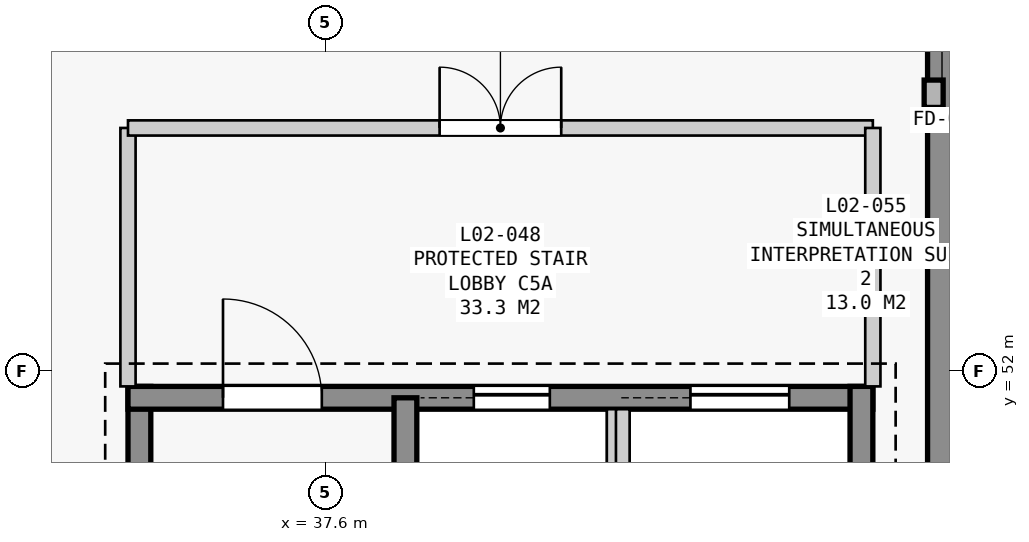
"""IFC4 building model, lengths in metres.
Left out: names, types, materials, properties, quantities, classifications, styles, units other than length and angle.
Written with IfcOpenShell. Run it as: python <this file> out.ifc"""

import sys

from ifc_helpers import new_model, si_unit, direction, frame, frame_2d, origin, place, context, subcontext, project, spatial, rectangle, extrude, element, fill, save


model = new_model("IFC4")
c1 = context("Model", 3, precision=1e-05, world=origin(), true_north=direction((0.0, 1.0)))
c2 = subcontext(c1, "Body", "Model", "MODEL_VIEW")
j1 = project(units=[si_unit("LENGTHUNIT", "METRE"), si_unit("PLANEANGLEUNIT", "RADIAN")], contexts=[c1])
p1 = place(None, origin())
s1 = spatial("IfcSite", under=j1, at=p1, CompositionType="ELEMENT")
p2 = place(p1, origin())
s2 = spatial("IfcBuilding", under=s1, at=p2, CompositionType="ELEMENT")
p3 = place(p2, frame((0.0, 0.0, 9.6)))
s3 = spatial("IfcBuildingStorey", under=s2, at=p3, CompositionType="ELEMENT", Elevation=9.6)
p4 = place(p3, frame((45.71, 75.71, 0.0), z_axis=(0.0, 0.0, 1.0), x_axis=(0.0, -1.0, 0.0)))
e1 = element("IfcWall", 1, at=p4, inside=s3, PredefinedType="STANDARD", context=c2, shape_type="SweptSolid", body=[
    extrude(rectangle(XDim=33.02, YDim=0.38, at=frame_2d((16.51, 0.0))), origin(), (0.0, 0.0, 1.0), 3.94),
])
p5 = place(p4, frame((17.61, 0.0, 0.0)))
e2 = element("IfcOpeningElement", 2, at=p5, cuts=e1, PredefinedType="OPENING", context=c2, shape_type="SweptSolid", body=[
    extrude(rectangle(XDim=1.8, YDim=2.2, at=frame_2d((0.9, 1.1))), frame((0.0, 0.2, 0.0), z_axis=(0.0, -1.0, 0.0), x_axis=(1.0, 0.0, 0.0)), (0.0, 0.0, 1.0), 0.4),
])
p6 = place(p3, frame((35.15, 43.7, 0.0), z_axis=(0.0, 0.0, 1.0), x_axis=(0.0, 1.0, 0.0)))
e3 = element("IfcWall", 3, at=p6, inside=s3, PredefinedType="SHEAR", context=c2, shape_type="SweptSolid", body=[
    extrude(rectangle(XDim=8.1, YDim=0.3, at=frame_2d((4.05, 0.0))), origin(), (0.0, 0.0, 1.0), 4.2),
])
p7 = place(p3, frame((35.0, 51.65, 0.0), z_axis=(0.0, 0.0, 1.0), x_axis=(1.0, 0.0, 0.0)))
e4 = element("IfcWall", 4, at=p7, inside=s3, PredefinedType="SHEAR", context=c2, shape_type="SweptSolid", body=[
    extrude(rectangle(XDim=9.8, YDim=0.3, at=frame_2d((4.9, 0.0))), origin(), (0.0, 0.0, 1.0), 4.2),
])
p8 = place(p7, frame((1.25, 0.0, 0.0)))
e5 = element("IfcOpeningElement", 5, at=p8, cuts=e4, PredefinedType="OPENING", context=c2, shape_type="SweptSolid", body=[
    extrude(rectangle(XDim=1.3, YDim=2.2, at=frame_2d((0.65, 1.1))), frame((0.0, 0.16, 0.0), z_axis=(0.0, -1.0, 0.0), x_axis=(1.0, 0.0, 0.0)), (0.0, 0.0, 1.0), 0.32),
])
p9 = place(p7, frame((4.55, 0.0, 0.0)))
e6 = element("IfcOpeningElement", 6, at=p9, cuts=e4, PredefinedType="OPENING", context=c2, shape_type="SweptSolid", body=[
    extrude(rectangle(XDim=1.0, YDim=2.15, at=frame_2d((0.5, 1.075))), frame((0.0, 0.16, 0.0), z_axis=(0.0, -1.0, 0.0), x_axis=(1.0, 0.0, 0.0)), (0.0, 0.0, 1.0), 0.32),
])
p10 = place(p7, frame((7.4, 0.0, 0.0)))
e7 = element("IfcOpeningElement", 7, at=p10, cuts=e4, PredefinedType="OPENING", context=c2, shape_type="SweptSolid", body=[
    extrude(rectangle(XDim=1.3, YDim=2.2, at=frame_2d((0.65, 1.1))), frame((0.0, 0.16, 0.0), z_axis=(0.0, -1.0, 0.0), x_axis=(1.0, 0.0, 0.0)), (0.0, 0.0, 1.0), 0.32),
])
p11 = place(p3, frame((44.65, 51.8, 0.0), z_axis=(0.0, 0.0, 1.0), x_axis=(0.0, -1.0, 0.0)))
e8 = element("IfcWall", 8, at=p11, inside=s3, PredefinedType="SHEAR", context=c2, shape_type="SweptSolid", body=[
    extrude(rectangle(XDim=8.1, YDim=0.3, at=frame_2d((4.05, 0.0))), origin(), (0.0, 0.0, 1.0), 4.2),
])
p12 = place(p3, frame((38.65, 43.85, 0.0), z_axis=(0.0, 0.0, 1.0), x_axis=(0.0, 1.0, 0.0)))
e9 = element("IfcWall", 9, at=p12, inside=s3, PredefinedType="SHEAR", context=c2, shape_type="SweptSolid", body=[
    extrude(rectangle(XDim=7.8, YDim=0.3, at=frame_2d((3.9, 0.0))), origin(), (0.0, 0.0, 1.0), 4.2),
])
p13 = place(p3, frame((41.39, 48.7, 0.0), z_axis=(0.0, 0.0, 1.0), x_axis=(0.0, 1.0, 0.0)))
e10 = element("IfcWall", 10, at=p13, inside=s3, PredefinedType="PARTITIONING", context=c2, shape_type="SweptSolid", body=[
    extrude(rectangle(XDim=2.8, YDim=0.18, at=frame_2d((1.4, 0.0))), origin(), (0.0, 0.0, 1.0), 4.2),
])
p14 = place(p3, frame((41.51, 48.2, 0.0), z_axis=(0.0, 0.0, 1.0), x_axis=(0.0, 1.0, 0.0)))
e11 = element("IfcWall", 11, at=p14, inside=s3, PredefinedType="PARTITIONING", context=c2, shape_type="SweptSolid", body=[
    extrude(rectangle(XDim=3.3, YDim=0.18, at=frame_2d((1.65, 0.0))), origin(), (0.0, 0.0, 1.0), 4.2),
])
p15 = place(p3, frame((35.0, 51.8, 0.0), z_axis=(0.0, 0.0, 1.0), x_axis=(0.0, 1.0, 0.0)))
e12 = element("IfcWall", 12, at=p15, inside=s3, PredefinedType="STANDARD", context=c2, shape_type="SweptSolid", body=[
    extrude(rectangle(XDim=3.4, YDim=0.2, at=frame_2d((1.7, 0.0))), origin(), (0.0, 0.0, 1.0), 4.2),
])
p16 = place(p3, frame((35.0, 55.2, 0.0), z_axis=(0.0, 0.0, 1.0), x_axis=(1.0, 0.0, 0.0)))
e13 = element("IfcWall", 13, at=p16, inside=s3, PredefinedType="STANDARD", context=c2, shape_type="SweptSolid", body=[
    extrude(rectangle(XDim=9.8, YDim=0.2, at=frame_2d((4.9, 0.0))), origin(), (0.0, 0.0, 1.0), 4.2),
])
p17 = place(p16, frame((4.1, 0.0, 0.0)))
e14 = element("IfcOpeningElement", 14, at=p17, cuts=e13, PredefinedType="OPENING", context=c2, shape_type="SweptSolid", body=[
    extrude(rectangle(XDim=1.6, YDim=2.2, at=frame_2d((0.8, 1.1))), frame((0.0, 0.11, 0.0), z_axis=(0.0, -1.0, 0.0), x_axis=(1.0, 0.0, 0.0)), (0.0, 0.0, 1.0), 0.22),
])
p18 = place(p3, frame((44.8, 55.2, 0.0), z_axis=(0.0, 0.0, 1.0), x_axis=(0.0, -1.0, 0.0)))
e15 = element("IfcWall", 15, at=p18, inside=s3, PredefinedType="STANDARD", context=c2, shape_type="SweptSolid", body=[
    extrude(rectangle(XDim=3.4, YDim=0.2, at=frame_2d((1.7, 0.0))), origin(), (0.0, 0.0, 1.0), 4.2),
])
p19 = place(p8, origin())
e16 = element("IfcDoor", 16, at=p19, inside=s3, OperationType="SINGLE_SWING_LEFT", PredefinedType="DOOR", context=c2, shape_type="SweptSolid", body=[
    extrude(rectangle(XDim=1.3, YDim=2.2, at=frame_2d((0.65, 1.1))), frame((0.0, 0.025, 0.0), z_axis=(0.0, -1.0, 0.0), x_axis=(1.0, 0.0, 0.0)), (0.0, 0.0, 1.0), 0.05),
])
fill(e5, e16)
p20 = place(p9, origin())
e17 = element("IfcDoor", 17, at=p20, inside=s3, OperationType="SLIDING_TO_LEFT", PredefinedType="DOOR", context=c2, shape_type="SweptSolid", body=[
    extrude(rectangle(XDim=1.0, YDim=2.15, at=frame_2d((0.5, 1.075))), frame((0.0, 0.025, 0.0), z_axis=(0.0, -1.0, 0.0), x_axis=(1.0, 0.0, 0.0)), (0.0, 0.0, 1.0), 0.05),
])
fill(e6, e17)
p21 = place(p10, origin())
e18 = element("IfcDoor", 18, at=p21, inside=s3, OperationType="SLIDING_TO_LEFT", PredefinedType="DOOR", context=c2, shape_type="SweptSolid", body=[
    extrude(rectangle(XDim=1.3, YDim=2.2, at=frame_2d((0.65, 1.1))), frame((0.0, 0.025, 0.0), z_axis=(0.0, -1.0, 0.0), x_axis=(1.0, 0.0, 0.0)), (0.0, 0.0, 1.0), 0.05),
])
fill(e7, e18)
p22 = place(p17, origin())
e19 = element("IfcDoor", 19, at=p22, inside=s3, OperationType="DOUBLE_DOOR_SINGLE_SWING", PredefinedType="DOOR", context=c2, shape_type="SweptSolid", body=[
    extrude(rectangle(XDim=1.6, YDim=2.2, at=frame_2d((0.8, 1.1))), frame((0.0, 0.025, 0.0), z_axis=(0.0, -1.0, 0.0), x_axis=(1.0, 0.0, 0.0)), (0.0, 0.0, 1.0), 0.05),
])
fill(e14, e19)
save(model, sys.argv[1])
